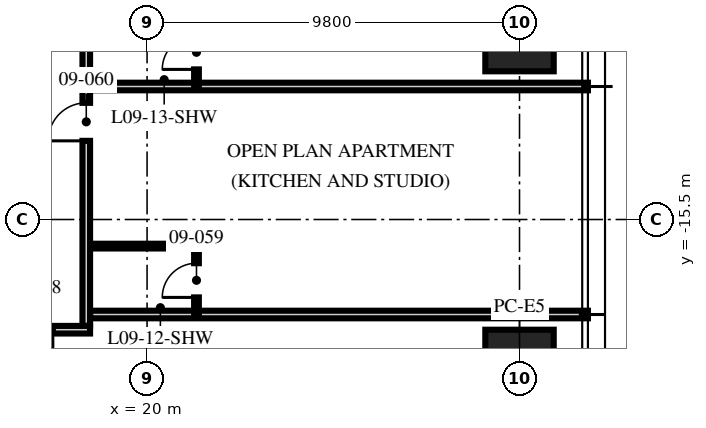
"""IFC4 building model, lengths in metres.
Left out: names, types, materials, properties, quantities, classifications, styles, units other than length and angle.
Written with IfcOpenShell. Run it as: python <this file> out.ifc"""

import sys

from ifc_helpers import new_model, si_unit, direction, frame, frame_2d, origin, origin_2d, place, context, subcontext, project, spatial, rectangle, hollow_rectangle, extrude, element, fill, save


model = new_model("IFC4")
c1 = context("Model", 3, precision=1e-05, world=origin(), true_north=direction((0.0, 1.0)))
c2 = subcontext(c1, "Body", "Model", "MODEL_VIEW")
j1 = project(units=[si_unit("LENGTHUNIT", "METRE"), si_unit("PLANEANGLEUNIT", "RADIAN")], contexts=[c1])
p1 = place(None, origin())
s1 = spatial("IfcSite", under=j1, at=p1, CompositionType="ELEMENT")
p2 = place(p1, origin())
s2 = spatial("IfcBuilding", under=s1, at=p2, CompositionType="ELEMENT")
p3 = place(p2, frame((0.0, 0.0, 39.75)))
s3 = spatial("IfcBuildingStorey", under=s2, at=p3, CompositionType="ELEMENT", Elevation=39.75)
for number, where, z_axis, x_axis in (
    (1, (29.8, -10.0, 0.0), (0.0, 0.0, 1.0), (0.0, 1.0, 0.0)),
    (2, (29.8, -20.0, 0.0), (0.0, 0.0, 1.0), (0.0, 1.0, 0.0)),
):
    element("IfcColumn", number, at=place(p3, frame(where, z_axis=z_axis, x_axis=x_axis)), inside=s3, PredefinedType="COLUMN", context=c2, shape_type="SweptSolid", body=[
        extrude(hollow_rectangle(XDim=3.2, YDim=1.8, WallThickness=0.2, at=origin_2d()), origin(), (0.0, 0.0, 1.0), 3.75),
    ])
p4 = place(p3, frame((18.5, -18.0, 0.0), z_axis=(0.0, 0.0, 1.0), x_axis=(1.0, 0.0, 0.0)))
e3 = element("IfcWall", 3, at=p4, inside=s3, PredefinedType="PARTITIONING", context=c2, shape_type="SweptSolid", body=[
    extrude(rectangle(XDim=13.1, YDim=0.2, at=frame_2d((6.55, 0.0))), origin(), (0.0, 0.0, 1.0), 2.3),
])
p5 = place(p3, frame((18.5, -12.0, 0.0), z_axis=(0.0, 0.0, 1.0), x_axis=(1.0, 0.0, 0.0)))
e4 = element("IfcWall", 4, at=p5, inside=s3, PredefinedType="PARTITIONING", context=c2, shape_type="SweptSolid", body=[
    extrude(rectangle(XDim=13.1, YDim=0.2, at=frame_2d((6.55, 0.0))), origin(), (0.0, 0.0, 1.0), 2.71),
])
p6 = place(p3, frame((21.3, -18.0, 0.0), z_axis=(0.0, 0.0, 1.0), x_axis=(0.0, 1.0, 0.0)))
e5 = element("IfcWall", 5, at=p6, inside=s3, PredefinedType="PARTITIONING", context=c2, shape_type="SweptSolid", body=[
    extrude(rectangle(XDim=1.8, YDim=0.125, at=frame_2d((0.9, 0.0))), origin(), (0.0, 0.0, 1.0), 3.5),
])
p7 = place(p6, frame((0.45, 0.0, 0.0)))
e6 = element("IfcOpeningElement", 6, at=p7, cuts=e5, PredefinedType="OPENING", context=c2, shape_type="SweptSolid", body=[
    extrude(rectangle(XDim=0.9, YDim=2.1, at=frame_2d((0.45, 1.05))), frame((0.0, 0.073, 0.0), z_axis=(0.0, -1.0, 0.0), x_axis=(1.0, 0.0, 0.0)), (0.0, 0.0, 1.0), 0.145),
])
p8 = place(p3, frame((18.5, -16.2, 0.0), z_axis=(0.0, 0.0, 1.0), x_axis=(1.0, 0.0, 0.0)))
e7 = element("IfcWall", 7, at=p8, inside=s3, PredefinedType="PARTITIONING", context=c2, shape_type="SweptSolid", body=[
    extrude(rectangle(XDim=2.8, YDim=0.125, at=frame_2d((1.4, 0.0))), origin(), (0.0, 0.0, 1.0), 3.5),
])
p9 = place(p3, frame((21.3, -12.0, 0.0), z_axis=(0.0, 0.0, 1.0), x_axis=(0.0, 1.0, 0.0)))
e8 = element("IfcWall", 8, at=p9, inside=s3, PredefinedType="PARTITIONING", context=c2, shape_type="SweptSolid", body=[
    extrude(rectangle(XDim=1.8, YDim=0.125, at=frame_2d((0.9, 0.0))), origin(), (0.0, 0.0, 1.0), 3.5),
])
p10 = place(p9, frame((0.45, 0.0, 0.0)))
e9 = element("IfcOpeningElement", 9, at=p10, cuts=e8, PredefinedType="OPENING", context=c2, shape_type="SweptSolid", body=[
    extrude(rectangle(XDim=0.9, YDim=2.1, at=frame_2d((0.45, 1.05))), frame((0.0, 0.073, 0.0), z_axis=(0.0, -1.0, 0.0), x_axis=(1.0, 0.0, 0.0)), (0.0, 0.0, 1.0), 0.145),
])
p11 = place(p3, frame((18.4, -18.3, 0.0), z_axis=(0.0, 0.0, 1.0), x_axis=(0.0, 1.0, 0.0)))
e10 = element("IfcWall", 10, at=p11, inside=s3, PredefinedType="PARTITIONING", context=c2, shape_type="SweptSolid", body=[
    extrude(rectangle(XDim=14.3, YDim=0.2, at=frame_2d((7.15, 0.0))), origin(), (0.0, 0.0, 1.0), 2.3),
])
p12 = place(p11, frame((4.87, 0.0, 0.0)))
e11 = element("IfcOpeningElement", 11, at=p12, cuts=e10, PredefinedType="OPENING", context=c2, shape_type="SweptSolid", body=[
    extrude(rectangle(XDim=1.0, YDim=2.2, at=frame_2d((0.5, 1.1))), frame((0.0, 0.11, 0.0), z_axis=(0.0, -1.0, 0.0), x_axis=(1.0, 0.0, 0.0)), (0.0, 0.0, 1.0), 0.22),
])
p13 = place(p11, frame((8.87, 0.0, 0.0)))
e12 = element("IfcOpeningElement", 12, at=p13, cuts=e10, PredefinedType="OPENING", context=c2, shape_type="SweptSolid", body=[
    extrude(rectangle(XDim=1.0, YDim=2.2, at=frame_2d((0.5, 1.1))), frame((0.0, 0.11, 0.0), z_axis=(0.0, -1.0, 0.0), x_axis=(1.0, 0.0, 0.0)), (0.0, 0.0, 1.0), 0.22),
])
p14 = place(p3, frame((18.5, -18.4, 0.0), z_axis=(0.0, 0.0, 1.0), x_axis=(-1.0, 0.0, 0.0)))
e13 = element("IfcWall", 13, at=p14, inside=s3, PredefinedType="PARTITIONING", context=c2, shape_type="SweptSolid", body=[
    extrude(rectangle(XDim=37.0, YDim=0.2, at=frame_2d((18.5, 0.0))), origin(), (0.0, 0.0, 1.0), 2.3),
])
p15 = place(p14, frame((26.93, 0.0, 0.0)))
e14 = element("IfcOpeningElement", 14, at=p15, cuts=e13, PredefinedType="OPENING", context=c2, shape_type="SweptSolid", body=[
    extrude(rectangle(XDim=1.0, YDim=2.2, at=frame_2d((0.5, 1.1))), frame((0.0, 0.11, 0.0), z_axis=(0.0, -1.0, 0.0), x_axis=(1.0, 0.0, 0.0)), (0.0, 0.0, 1.0), 0.22),
])
p16 = place(p14, frame((0.98, 0.0, 0.0)))
e15 = element("IfcOpeningElement", 15, at=p16, cuts=e13, PredefinedType="OPENING", context=c2, shape_type="SweptSolid", body=[
    extrude(rectangle(XDim=1.0, YDim=2.2, at=frame_2d((0.5, 1.1))), frame((0.0, 0.11, 0.0), z_axis=(0.0, -1.0, 0.0), x_axis=(1.0, 0.0, 0.0)), (0.0, 0.0, 1.0), 0.22),
])
p17 = place(p16, origin())
e16 = element("IfcDoor", 16, at=p17, inside=s3, OperationType="SINGLE_SWING_LEFT", PredefinedType="DOOR", context=c2, shape_type="SweptSolid", body=[
    extrude(rectangle(XDim=1.0, YDim=2.2, at=frame_2d((0.5, 1.1))), frame((0.0, 0.025, 0.0), z_axis=(0.0, -1.0, 0.0), x_axis=(1.0, 0.0, 0.0)), (0.0, 0.0, 1.0), 0.05),
])
fill(e15, e16)
p18 = place(p7, origin())
e17 = element("IfcDoor", 17, at=p18, inside=s3, OperationType="SINGLE_SWING_LEFT", PredefinedType="DOOR", context=c2, shape_type="SweptSolid", body=[
    extrude(rectangle(XDim=0.9, YDim=2.1, at=frame_2d((0.45, 1.05))), frame((0.0, 0.025, 0.0), z_axis=(0.0, -1.0, 0.0), x_axis=(1.0, 0.0, 0.0)), (0.0, 0.0, 1.0), 0.05),
])
fill(e6, e17)
p19 = place(p12, origin())
e18 = element("IfcDoor", 18, at=p19, inside=s3, OperationType="SINGLE_SWING_LEFT", PredefinedType="DOOR", context=c2, shape_type="SweptSolid", body=[
    extrude(rectangle(XDim=1.0, YDim=2.2, at=frame_2d((0.5, 1.1))), frame((0.0, 0.025, 0.0), z_axis=(0.0, -1.0, 0.0), x_axis=(1.0, 0.0, 0.0)), (0.0, 0.0, 1.0), 0.05),
])
fill(e11, e18)
p20 = place(p10, origin())
e19 = element("IfcDoor", 19, at=p20, inside=s3, OperationType="SINGLE_SWING_LEFT", PredefinedType="DOOR", context=c2, shape_type="SweptSolid", body=[
    extrude(rectangle(XDim=0.9, YDim=2.1, at=frame_2d((0.45, 1.05))), frame((0.0, 0.025, 0.0), z_axis=(0.0, -1.0, 0.0), x_axis=(1.0, 0.0, 0.0)), (0.0, 0.0, 1.0), 0.05),
])
fill(e9, e19)
save(model, sys.argv[1])
